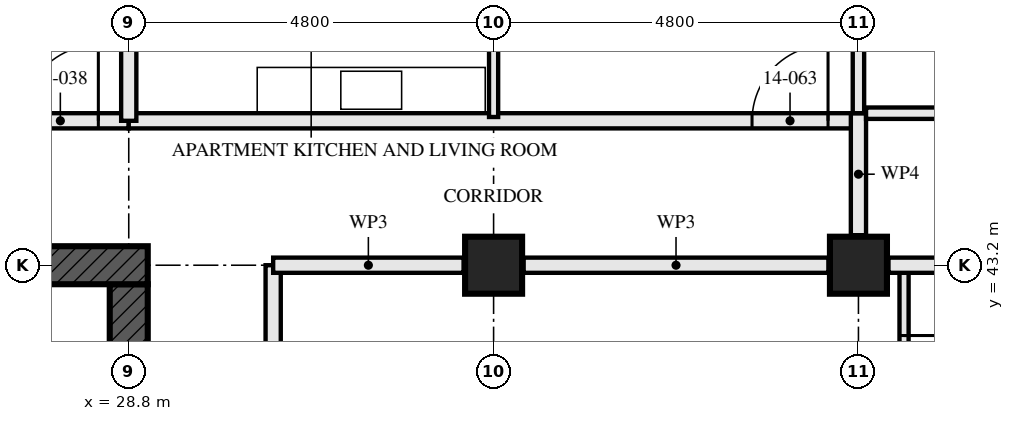
"""IFC4 building model, lengths in metres.
Left out: names, types, materials, properties, quantities, classifications, styles, units other than length and angle.
Written with IfcOpenShell. Run it as: python <this file> out.ifc"""

import sys

from ifc_helpers import new_model, si_unit, direction, frame, frame_2d, origin, origin_2d, place, context, subcontext, project, spatial, rectangle, hollow_rectangle, extrude, element, fill, save


model = new_model("IFC4")
c1 = context("Model", 3, precision=1e-05, world=origin(), true_north=direction((0.0, 1.0)))
c2 = subcontext(c1, "Body", "Model", "MODEL_VIEW")
j1 = project(units=[si_unit("LENGTHUNIT", "METRE"), si_unit("PLANEANGLEUNIT", "RADIAN")], contexts=[c1])
p1 = place(None, origin())
s1 = spatial("IfcSite", under=j1, at=p1, CompositionType="ELEMENT")
p2 = place(p1, origin())
s2 = spatial("IfcBuilding", under=s1, at=p2, CompositionType="ELEMENT")
p3 = place(p2, frame((0.0, 0.0, 55.0)))
s3 = spatial("IfcBuildingStorey", under=s2, at=p3, CompositionType="ELEMENT", Elevation=55.0)
for number, where, z_axis, x_axis in (
    (1, (33.6, 43.2, 0.0), (0.0, 0.0, 1.0), (0.0, 1.0, 0.0)),
    (2, (38.4, 43.2, 0.0), (0.0, 0.0, 1.0), (0.0, 1.0, 0.0)),
):
    element("IfcColumn", number, at=place(p3, frame(where, z_axis=z_axis, x_axis=x_axis)), inside=s3, PredefinedType="COLUMN", context=c2, shape_type="SweptSolid", body=[
        extrude(hollow_rectangle(XDim=0.75, YDim=0.75, WallThickness=0.08, at=origin_2d()), origin(), (0.0, 0.0, 1.0), 3.5),
    ])
p4 = place(p3, frame((29.05, 43.2, -0.17), z_axis=(0.0, 0.0, 1.0), x_axis=(-1.0, 0.0, 0.0)))
e3 = element("IfcWall", 3, at=p4, inside=s3, PredefinedType="SHEAR", context=c2, shape_type="SweptSolid", body=[
    extrude(rectangle(XDim=14.9, YDim=0.5, at=frame_2d((7.45, 0.0))), origin(), (0.0, 0.0, 1.0), 3.5),
])
p5 = place(p4, frame((6.85, 0.0, 0.17)))
e4 = element("IfcOpeningElement", 4, at=p5, cuts=e3, PredefinedType="OPENING", context=c2, shape_type="SweptSolid", body=[
    extrude(rectangle(XDim=1.2, YDim=2.1, at=frame_2d((0.6, 1.05))), frame((0.0, 0.26, 0.0), z_axis=(0.0, -1.0, 0.0), x_axis=(1.0, 0.0, 0.0)), (0.0, 0.0, 1.0), 0.521),
])
p6 = place(p3, frame((28.8, 29.05, -0.17), z_axis=(0.0, 0.0, 1.0), x_axis=(0.0, 1.0, 0.0)))
e5 = element("IfcWall", 5, at=p6, inside=s3, PredefinedType="SHEAR", context=c2, shape_type="SweptSolid", body=[
    extrude(rectangle(XDim=13.9, YDim=0.5, at=frame_2d((6.95, 0.0))), origin(), (0.0, 0.0, 1.0), 3.5),
])
p7 = place(p6, frame((6.35, 0.0, 0.17)))
e6 = element("IfcOpeningElement", 6, at=p7, cuts=e5, PredefinedType="OPENING", context=c2, shape_type="SweptSolid", body=[
    extrude(rectangle(XDim=1.2, YDim=2.1, at=frame_2d((0.6, 1.05))), frame((0.0, 0.26, 0.0), z_axis=(0.0, -1.0, 0.0), x_axis=(1.0, 0.0, 0.0)), (0.0, 0.0, 1.0), 0.521),
])
p8 = place(p3, frame((28.8, 45.1, 0.0), z_axis=(0.0, 0.0, 1.0), x_axis=(-1.0, 0.0, 0.0)))
e7 = element("IfcWall", 7, at=p8, inside=s3, PredefinedType="PARTITIONING", context=c2, shape_type="SweptSolid", body=[
    extrude(rectangle(XDim=14.4, YDim=0.2, at=frame_2d((7.2, 0.0))), origin(), (0.0, 0.0, 1.0), 3.33),
])
p9 = place(p8, frame((0.4, 0.0, 0.0)))
e8 = element("IfcOpeningElement", 8, at=p9, cuts=e7, PredefinedType="OPENING", context=c2, shape_type="SweptSolid", body=[
    extrude(rectangle(XDim=1.0, YDim=2.1, at=frame_2d((0.5, 1.05))), frame((0.0, 0.111, 0.0), z_axis=(0.0, -1.0, 0.0), x_axis=(1.0, 0.0, 0.0)), (0.0, 0.0, 1.0), 0.221),
])
p10 = place(p8, frame((5.2, 0.0, 0.0)))
e9 = element("IfcOpeningElement", 9, at=p10, cuts=e7, PredefinedType="OPENING", context=c2, shape_type="SweptSolid", body=[
    extrude(rectangle(XDim=1.0, YDim=2.1, at=frame_2d((0.5, 1.05))), frame((0.0, 0.111, 0.0), z_axis=(0.0, -1.0, 0.0), x_axis=(1.0, 0.0, 0.0)), (0.0, 0.0, 1.0), 0.221),
])
p11 = place(p8, frame((10.0, 0.0, 0.0)))
e10 = element("IfcOpeningElement", 10, at=p11, cuts=e7, PredefinedType="OPENING", context=c2, shape_type="SweptSolid", body=[
    extrude(rectangle(XDim=1.0, YDim=2.1, at=frame_2d((0.5, 1.05))), frame((0.0, 0.111, 0.0), z_axis=(0.0, -1.0, 0.0), x_axis=(1.0, 0.0, 0.0)), (0.0, 0.0, 1.0), 0.221),
])
p12 = place(p3, frame((39.0, 38.4, 0.0), z_axis=(0.0, 0.0, 1.0), x_axis=(0.0, 1.0, 0.0)))
e11 = element("IfcWall", 11, at=p12, inside=s3, PredefinedType="PARTITIONING", context=c2, shape_type="SweptSolid", body=[
    extrude(rectangle(XDim=4.8, YDim=0.12, at=frame_2d((2.4, 0.0))), origin(), (0.0, 0.0, 1.0), 3.33),
])
p13 = place(p12, frame((2.975, 0.0, 0.0)))
e12 = element("IfcOpeningElement", 12, at=p13, cuts=e11, PredefinedType="OPENING", context=c2, shape_type="SweptSolid", body=[
    extrude(rectangle(XDim=0.9, YDim=2.1, at=frame_2d((0.45, 1.05))), frame((0.0, 0.071, 0.0), z_axis=(0.0, -1.0, 0.0), x_axis=(1.0, 0.0, 0.0)), (0.0, 0.0, 1.0), 0.141),
])
p14 = place(p3, frame((30.7, 28.8, 0.0), z_axis=(0.0, 0.0, 1.0), x_axis=(0.0, 1.0, 0.0)))
e13 = element("IfcWall", 13, at=p14, inside=s3, PredefinedType="PARTITIONING", context=c2, shape_type="SweptSolid", body=[
    extrude(rectangle(XDim=14.4, YDim=0.2, at=frame_2d((7.2, 0.0))), origin(), (0.0, 0.0, 1.0), 2.55),
])
p15 = place(p14, frame((1.4, 0.0, 0.0)))
e14 = element("IfcOpeningElement", 14, at=p15, cuts=e13, PredefinedType="OPENING", context=c2, shape_type="SweptSolid", body=[
    extrude(rectangle(XDim=1.0, YDim=2.1, at=frame_2d((0.5, 1.05))), frame((0.0, 0.111, 0.0), z_axis=(0.0, -1.0, 0.0), x_axis=(1.0, 0.0, 0.0)), (0.0, 0.0, 1.0), 0.221),
])
p16 = place(p14, frame((4.1, 0.0, 0.0)))
e15 = element("IfcOpeningElement", 15, at=p16, cuts=e13, PredefinedType="OPENING", context=c2, shape_type="SweptSolid", body=[
    extrude(rectangle(XDim=1.0, YDim=2.1, at=frame_2d((0.5, 1.05))), frame((0.0, 0.111, 0.0), z_axis=(0.0, -1.0, 0.0), x_axis=(1.0, 0.0, 0.0)), (0.0, 0.0, 1.0), 0.221),
])
p17 = place(p14, frame((5.975, 0.0, 0.0)))
e16 = element("IfcOpeningElement", 16, at=p17, cuts=e13, PredefinedType="OPENING", context=c2, shape_type="SweptSolid", body=[
    extrude(rectangle(XDim=1.0, YDim=2.1, at=frame_2d((0.5, 1.05))), frame((0.0, 0.111, 0.0), z_axis=(0.0, -1.0, 0.0), x_axis=(1.0, 0.0, 0.0)), (0.0, 0.0, 1.0), 0.221),
])
p18 = place(p14, frame((10.0, 0.0, 0.0)))
e17 = element("IfcOpeningElement", 17, at=p18, cuts=e13, PredefinedType="OPENING", context=c2, shape_type="SweptSolid", body=[
    extrude(rectangle(XDim=1.0, YDim=2.1, at=frame_2d((0.5, 1.05))), frame((0.0, 0.111, 0.0), z_axis=(0.0, -1.0, 0.0), x_axis=(1.0, 0.0, 0.0)), (0.0, 0.0, 1.0), 0.221),
])
p19 = place(p3, frame((38.4, 48.2, 0.0), z_axis=(0.0, 0.0, 1.0), x_axis=(0.0, -1.0, 0.0)))
e18 = element("IfcWall", 18, at=p19, inside=s3, PredefinedType="PARTITIONING", context=c2, shape_type="SweptSolid", body=[
    extrude(rectangle(XDim=3.0, YDim=0.15, at=frame_2d((1.5, 0.0))), origin(), (0.0, 0.0, 1.0), 2.55),
])
p20 = place(p19, frame((1.05, 0.0, 0.0)))
e19 = element("IfcOpeningElement", 19, at=p20, cuts=e18, PredefinedType="OPENING", context=c2, shape_type="SweptSolid", body=[
    extrude(rectangle(XDim=0.9, YDim=2.1, at=frame_2d((0.45, 1.05))), frame((0.0, 0.085, 0.0), z_axis=(0.0, -1.0, 0.0), x_axis=(1.0, 0.0, 0.0)), (0.0, 0.0, 1.0), 0.171),
])
p21 = place(p3, frame((33.6, 53.4, 0.0), z_axis=(0.0, 0.0, 1.0), x_axis=(0.0, -1.0, 0.0)))
e20 = element("IfcWall", 20, at=p21, inside=s3, PredefinedType="PARTITIONING", context=c2, shape_type="SweptSolid", body=[
    extrude(rectangle(XDim=8.25, YDim=0.12, at=frame_2d((4.125, 0.0))), origin(), (0.0, 0.0, 1.0), 2.55),
])
p22 = place(p21, frame((5.15, 0.0, 0.0)))
e21 = element("IfcOpeningElement", 21, at=p22, cuts=e20, PredefinedType="OPENING", context=c2, shape_type="SweptSolid", body=[
    extrude(rectangle(XDim=0.9, YDim=2.1, at=frame_2d((0.45, 1.05))), frame((0.0, 0.071, 0.0), z_axis=(0.0, -1.0, 0.0), x_axis=(1.0, 0.0, 0.0)), (0.0, 0.0, 1.0), 0.141),
])
p23 = place(p3, frame((38.4, 45.1, 0.0), z_axis=(0.0, 0.0, 1.0), x_axis=(-1.0, 0.0, 0.0)))
e22 = element("IfcWall", 22, at=p23, inside=s3, PredefinedType="PARTITIONING", context=c2, shape_type="SweptSolid", body=[
    extrude(rectangle(XDim=9.6, YDim=0.2, at=frame_2d((4.8, 0.0))), origin(), (0.0, 0.0, 1.0), 3.33),
])
p24 = place(p23, frame((0.4, 0.0, 0.0)))
e23 = element("IfcOpeningElement", 23, at=p24, cuts=e22, PredefinedType="OPENING", context=c2, shape_type="SweptSolid", body=[
    extrude(rectangle(XDim=1.0, YDim=2.1, at=frame_2d((0.5, 1.05))), frame((0.0, 0.111, 0.0), z_axis=(0.0, -1.0, 0.0), x_axis=(1.0, 0.0, 0.0)), (0.0, 0.0, 1.0), 0.221),
])
p25 = place(p3, frame((38.4, 45.2, 0.0), z_axis=(0.0, 0.0, 1.0), x_axis=(0.0, -1.0, 0.0)))
e24 = element("IfcWall", 24, at=p25, inside=s3, PredefinedType="PARTITIONING", context=c2, shape_type="SweptSolid", body=[
    extrude(rectangle(XDim=1.605, YDim=0.2, at=frame_2d((0.802, 0.0))), origin(), (0.0, 0.0, 1.0), 3.33),
])
p26 = place(p3, frame((28.8, 45.1, 0.0), z_axis=(0.0, 0.0, 1.0), x_axis=(0.0, 1.0, 0.0)))
e25 = element("IfcWall", 25, at=p26, inside=s3, PredefinedType="PARTITIONING", context=c2, shape_type="SweptSolid", body=[
    extrude(rectangle(XDim=2.555, YDim=0.2, at=frame_2d((1.277, 0.0))), origin(), (0.0, 0.0, 1.0), 2.32),
])
p27 = place(p3, frame((42.905, 43.2, 0.0), z_axis=(0.0, 0.0, 1.0), x_axis=(-1.0, 0.0, 0.0)))
e26 = element("IfcWall", 26, at=p27, inside=s3, PredefinedType="PARTITIONING", context=c2, shape_type="SweptSolid", body=[
    extrude(rectangle(XDim=4.11, YDim=0.2, at=frame_2d((2.055, 0.0))), origin(), (0.0, 0.0, 1.0), 2.32),
])
p28 = place(p3, frame((38.005, 43.2, 0.0), z_axis=(0.0, 0.0, 1.0), x_axis=(-1.0, 0.0, 0.0)))
e27 = element("IfcWall", 27, at=p28, inside=s3, PredefinedType="PARTITIONING", context=c2, shape_type="SweptSolid", body=[
    extrude(rectangle(XDim=4.01, YDim=0.2, at=frame_2d((2.005, 0.0))), origin(), (0.0, 0.0, 1.0), 2.32),
])
p29 = place(p3, frame((33.205, 43.2, 0.0), z_axis=(0.0, 0.0, 1.0), x_axis=(-1.0, 0.0, 0.0)))
e28 = element("IfcWall", 28, at=p29, inside=s3, PredefinedType="PARTITIONING", context=c2, shape_type="SweptSolid", body=[
    extrude(rectangle(XDim=2.505, YDim=0.2, at=frame_2d((1.252, 0.0))), origin(), (0.0, 0.0, 1.0), 2.32),
])
p30 = place(p3, frame((43.63, 45.2, 0.0), z_axis=(0.0, 0.0, 1.0), x_axis=(-1.0, 0.0, 0.0)))
e29 = element("IfcWall", 29, at=p30, inside=s3, PredefinedType="PARTITIONING", context=c2, shape_type="SweptSolid", body=[
    extrude(rectangle(XDim=5.13, YDim=0.15, at=frame_2d((2.565, 0.0))), origin(), (0.0, 0.0, 1.0), 2.32),
])
p31 = place(p9, frame((1.0, 0.0, 0.0), z_axis=(0.0, 0.0, 1.0), x_axis=(-1.0, 0.0, 0.0)))
e30 = element("IfcDoor", 30, at=p31, inside=s3, OperationType="SINGLE_SWING_LEFT", PredefinedType="DOOR", context=c2, shape_type="SweptSolid", body=[
    extrude(rectangle(XDim=1.0, YDim=2.1, at=frame_2d((0.5, 1.05))), frame((0.0, 0.027, 0.0), z_axis=(0.0, -1.0, 0.0), x_axis=(1.0, 0.0, 0.0)), (0.0, 0.0, 1.0), 0.054),
])
fill(e8, e30)
p32 = place(p13, frame((0.9, 0.0, 0.0), z_axis=(0.0, 0.0, 1.0), x_axis=(-1.0, 0.0, 0.0)))
e31 = element("IfcDoor", 31, at=p32, inside=s3, OperationType="SINGLE_SWING_RIGHT", PredefinedType="DOOR", context=c2, shape_type="SweptSolid", body=[
    extrude(rectangle(XDim=0.9, YDim=2.1, at=frame_2d((0.45, 1.05))), frame((0.0, 0.022, 0.0), z_axis=(0.0, -1.0, 0.0), x_axis=(1.0, 0.0, 0.0)), (0.0, 0.0, 1.0), 0.044),
])
fill(e12, e31)
p33 = place(p24, frame((1.0, 0.0, 0.0), z_axis=(0.0, 0.0, 1.0), x_axis=(-1.0, 0.0, 0.0)))
e32 = element("IfcDoor", 32, at=p33, inside=s3, OperationType="SINGLE_SWING_LEFT", PredefinedType="DOOR", context=c2, shape_type="SweptSolid", body=[
    extrude(rectangle(XDim=1.0, YDim=2.1, at=frame_2d((0.5, 1.05))), frame((0.0, 0.027, 0.0), z_axis=(0.0, -1.0, 0.0), x_axis=(1.0, 0.0, 0.0)), (0.0, 0.0, 1.0), 0.054),
])
fill(e23, e32)
save(model, sys.argv[1])
